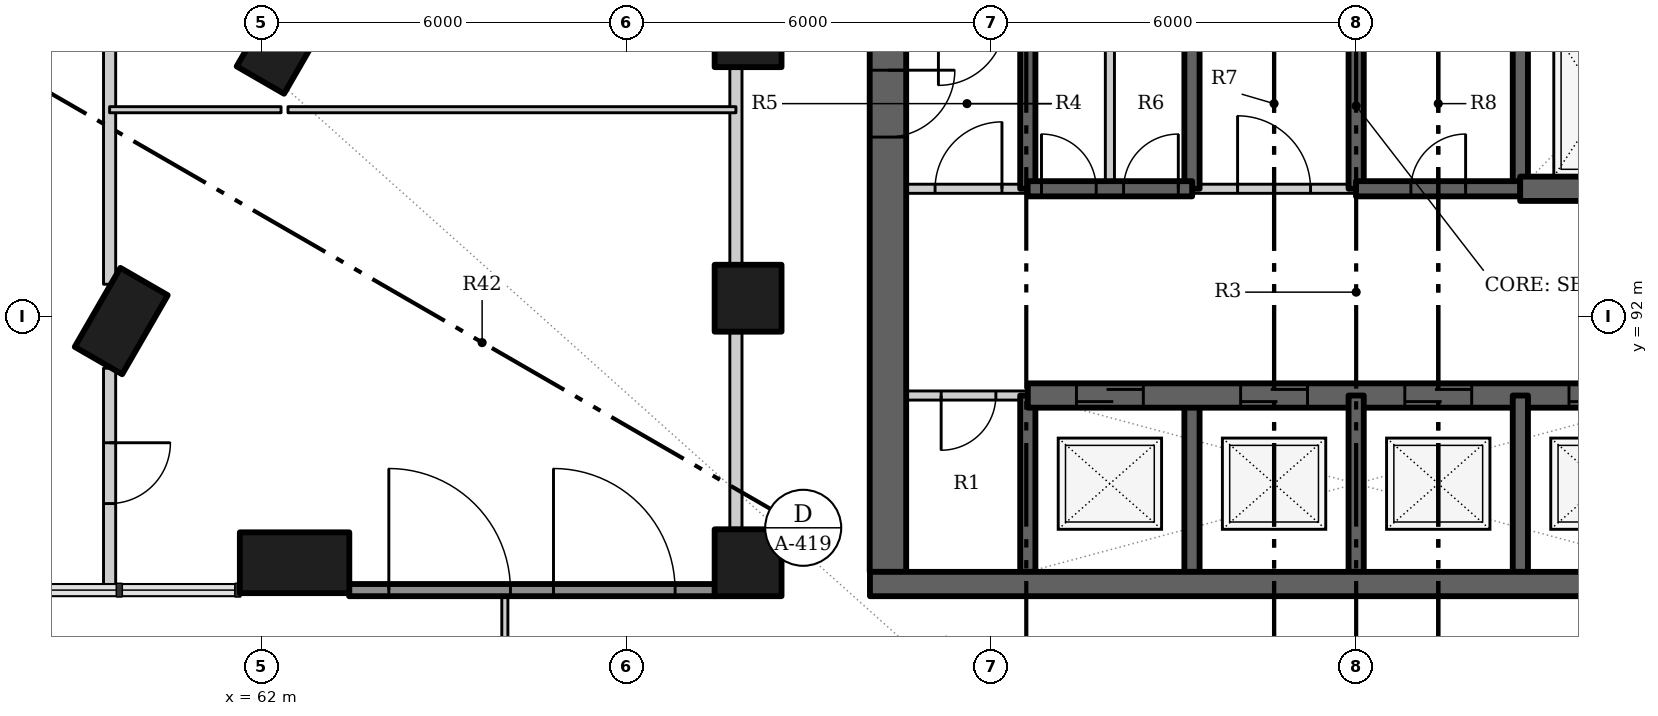
"""IFC4 building model, lengths in metres.
Left out: names, types, materials, properties, quantities, classifications, styles, units other than length and angle.
Written with IfcOpenShell. Run it as: python <this file> out.ifc"""

import sys

from ifc_helpers import new_model, si_unit, direction, frame, frame_2d, origin, origin_2d, place, context, subcontext, project, spatial, rectangle, extrude, element, fill, save


model = new_model("IFC4")
c1 = context("Model", 3, precision=1e-05, world=origin(), true_north=direction((0.0, 1.0)))
c2 = subcontext(c1, "Body", "Model", "MODEL_VIEW")
j1 = project(units=[si_unit("LENGTHUNIT", "METRE"), si_unit("PLANEANGLEUNIT", "RADIAN")], contexts=[c1])
p1 = place(None, origin())
s1 = spatial("IfcSite", under=j1, at=p1, CompositionType="ELEMENT")
p2 = place(p1, origin())
s2 = spatial("IfcBuilding", under=s1, at=p2, CompositionType="ELEMENT")
p3 = place(p2, origin())
s3 = spatial("IfcBuildingStorey", under=s2, at=p3, CompositionType="ELEMENT", Elevation=0.0)
for number, where, z_axis, x_axis in (
    (1, (62.354, 96.537, -1.8), (0.0, 0.0, 1.0), (-0.5, -0.866, 0.0)),
    (2, (59.692, 91.925, -1.8), (0.0, 0.0, 1.0), (-0.5, -0.866, 0.0)),
):
    element("IfcColumn", number, at=place(p3, frame(where, z_axis=z_axis, x_axis=x_axis)), inside=s3, PredefinedType="COLUMN", context=c2, shape_type="SweptSolid", body=[
        extrude(rectangle(XDim=1.5, YDim=0.9, at=origin_2d()), origin(), (0.0, 0.0, 1.0), 8.4),
    ])
for number, where, z_axis, x_axis in (
    (3, (70.0, 96.65, -1.8), (0.0, 0.0, 1.0), (0.0, -1.0, 0.0)),
    (4, (70.0, 92.3, -1.8), (0.0, 0.0, 1.0), (0.0, -1.0, 0.0)),
    (5, (70.0, 87.95, -1.8), (0.0, 0.0, 1.0), (0.0, -1.0, 0.0)),
):
    element("IfcColumn", number, at=place(p3, frame(where, z_axis=z_axis, x_axis=x_axis)), inside=s3, PredefinedType="COLUMN", context=c2, shape_type="SweptSolid", body=[
        extrude(rectangle(XDim=1.1, YDim=1.1, at=origin_2d()), origin(), (0.0, 0.0, 1.0), 8.4),
    ])
p4 = place(p3, frame((62.542, 87.95, -1.8), z_axis=(0.0, 0.0, 1.0), x_axis=(1.0, 0.0, 0.0)))
e6 = element("IfcColumn", 6, at=p4, inside=s3, PredefinedType="COLUMN", context=c2, shape_type="SweptSolid", body=[
    extrude(rectangle(XDim=1.8, YDim=1.0, at=origin_2d()), origin(), (0.0, 0.0, 1.0), 8.4),
])
p5 = place(p3, frame((63.438, 87.5, 0.0), z_axis=(0.0, 0.0, 1.0), x_axis=(1.0, 0.0, 0.0)))
e7 = element("IfcWall", 7, at=p5, inside=s3, PredefinedType="SOLIDWALL", context=c2, shape_type="SweptSolid", body=[
    extrude(rectangle(XDim=6.016, YDim=0.2, at=frame_2d((3.008, 0.0))), origin(), (0.0, 0.0, 1.0), 5.4),
])
p6 = place(p5, frame((0.654, 0.0, 0.0)))
e8 = element("IfcOpeningElement", 8, at=p6, cuts=e7, PredefinedType="OPENING", context=c2, shape_type="SweptSolid", body=[
    extrude(rectangle(XDim=2.0, YDim=2.4, at=frame_2d((1.0, 1.2))), frame((0.0, 0.11, 0.0), z_axis=(0.0, -1.0, 0.0), x_axis=(1.0, 0.0, 0.0)), (0.0, 0.0, 1.0), 0.22),
])
p7 = place(p5, frame((3.362, 0.0, 0.0)))
e9 = element("IfcOpeningElement", 9, at=p7, cuts=e7, PredefinedType="OPENING", context=c2, shape_type="SweptSolid", body=[
    extrude(rectangle(XDim=2.0, YDim=2.4, at=frame_2d((1.0, 1.2))), frame((0.0, 0.11, 0.0), z_axis=(0.0, -1.0, 0.0), x_axis=(1.0, 0.0, 0.0)), (0.0, 0.0, 1.0), 0.22),
])
p8 = place(p3, frame((74.6, 87.8, -1.8), z_axis=(0.0, 0.0, 1.0), x_axis=(0.0, 1.0, 0.0)))
e10 = element("IfcWall", 10, at=p8, inside=s3, PredefinedType="SHEAR", context=c2, shape_type="SweptSolid", body=[
    extrude(rectangle(XDim=2.9, YDim=0.25, at=frame_2d((1.45, 0.0))), origin(), (0.0, 0.0, 1.0), 8.1),
])
p9 = place(p3, frame((74.6, 94.1, -1.8), z_axis=(0.0, 0.0, 1.0), x_axis=(0.0, 1.0, 0.0)))
e11 = element("IfcWall", 11, at=p9, inside=s3, PredefinedType="SHEAR", context=c2, shape_type="SweptSolid", body=[
    extrude(rectangle(XDim=2.8, YDim=0.25, at=frame_2d((1.4, 0.0))), origin(), (0.0, 0.0, 1.0), 8.1),
])
p10 = place(p3, frame((74.6, 90.7, 0.0), z_axis=(0.0, 0.0, 1.0), x_axis=(-1.0, 0.0, 0.0)))
e12 = element("IfcWall", 12, at=p10, inside=s3, PredefinedType="PARTITIONING", context=c2, shape_type="SweptSolid", body=[
    extrude(rectangle(XDim=2.6, YDim=0.15, at=frame_2d((1.3, 0.0))), origin(), (0.0, 0.0, 1.0), 6.3),
])
p11 = place(p10, frame((0.525, 0.0, 0.0)))
e13 = element("IfcOpeningElement", 13, at=p11, cuts=e12, PredefinedType="OPENING", context=c2, shape_type="SweptSolid", body=[
    extrude(rectangle(XDim=0.9, YDim=2.1, at=frame_2d((0.45, 1.05))), frame((0.0, 0.085, 0.0), z_axis=(0.0, -1.0, 0.0), x_axis=(1.0, 0.0, 0.0)), (0.0, 0.0, 1.0), 0.17),
])
p12 = place(p3, frame((72.3, 96.9, -1.8), z_axis=(0.0, 0.0, 1.0), x_axis=(0.0, -1.0, 0.0)))
e14 = element("IfcWall", 14, at=p12, inside=s3, PredefinedType="SHEAR", context=c2, shape_type="SweptSolid", body=[
    extrude(rectangle(XDim=9.1, YDim=0.6, at=frame_2d((4.55, 0.0))), origin(), (0.0, 0.0, 1.0), 8.1),
])
p13 = place(p12, frame((0.85, 0.0, 1.8)))
e15 = element("IfcOpeningElement", 15, at=p13, cuts=e14, PredefinedType="OPENING", context=c2, shape_type="SweptSolid", body=[
    extrude(rectangle(XDim=1.1, YDim=2.1, at=frame_2d((0.55, 1.05))), frame((0.0, 0.31, 0.0), z_axis=(0.0, -1.0, 0.0), x_axis=(1.0, 0.0, 0.0)), (0.0, 0.0, 1.0), 0.62),
])
p14 = place(p3, frame((77.3, 87.8, -1.8), z_axis=(0.0, 0.0, 1.0), x_axis=(0.0, 1.0, 0.0)))
e16 = element("IfcWall", 16, at=p14, inside=s3, PredefinedType="SHEAR", context=c2, shape_type="SweptSolid", body=[
    extrude(rectangle(XDim=2.9, YDim=0.25, at=frame_2d((1.45, 0.0))), origin(), (0.0, 0.0, 1.0), 8.1),
])
p15 = place(p3, frame((77.3, 94.1, -1.8), z_axis=(0.0, 0.0, 1.0), x_axis=(0.0, 1.0, 0.0)))
e17 = element("IfcWall", 17, at=p15, inside=s3, PredefinedType="SHEAR", context=c2, shape_type="SweptSolid", body=[
    extrude(rectangle(XDim=2.8, YDim=0.25, at=frame_2d((1.4, 0.0))), origin(), (0.0, 0.0, 1.0), 8.1),
])
p16 = place(p3, frame((74.6, 90.7, -1.8), z_axis=(0.0, 0.0, 1.0), x_axis=(1.0, 0.0, 0.0)))
e18 = element("IfcWall", 18, at=p16, inside=s3, PredefinedType="SHEAR", context=c2, shape_type="SweptSolid", body=[
    extrude(rectangle(XDim=10.8, YDim=0.4, at=frame_2d((5.4, 0.0))), origin(), (0.0, 0.0, 1.0), 8.1),
])
p17 = place(p16, frame((0.8, 0.0, 1.8)))
e19 = element("IfcOpeningElement", 19, at=p17, cuts=e18, PredefinedType="OPENING", context=c2, shape_type="SweptSolid", body=[
    extrude(rectangle(XDim=1.1, YDim=2.1, at=frame_2d((0.55, 1.05))), frame((0.0, 0.21, 0.0), z_axis=(0.0, -1.0, 0.0), x_axis=(1.0, 0.0, 0.0)), (0.0, 0.0, 1.0), 0.42),
])
p18 = place(p16, frame((3.5, 0.0, 1.8)))
e20 = element("IfcOpeningElement", 20, at=p18, cuts=e18, PredefinedType="OPENING", context=c2, shape_type="SweptSolid", body=[
    extrude(rectangle(XDim=1.1, YDim=2.1, at=frame_2d((0.55, 1.05))), frame((0.0, 0.21, 0.0), z_axis=(0.0, -1.0, 0.0), x_axis=(1.0, 0.0, 0.0)), (0.0, 0.0, 1.0), 0.42),
])
p19 = place(p16, frame((6.2, 0.0, 1.8)))
e21 = element("IfcOpeningElement", 21, at=p19, cuts=e18, PredefinedType="OPENING", context=c2, shape_type="SweptSolid", body=[
    extrude(rectangle(XDim=1.1, YDim=2.1, at=frame_2d((0.55, 1.05))), frame((0.0, 0.21, 0.0), z_axis=(0.0, -1.0, 0.0), x_axis=(1.0, 0.0, 0.0)), (0.0, 0.0, 1.0), 0.42),
])
p20 = place(p16, frame((8.9, 0.0, 1.8)))
e22 = element("IfcOpeningElement", 22, at=p20, cuts=e18, PredefinedType="OPENING", context=c2, shape_type="SweptSolid", body=[
    extrude(rectangle(XDim=1.1, YDim=2.1, at=frame_2d((0.55, 1.05))), frame((0.0, 0.21, 0.0), z_axis=(0.0, -1.0, 0.0), x_axis=(1.0, 0.0, 0.0)), (0.0, 0.0, 1.0), 0.42),
])
p21 = place(p3, frame((80.0, 87.8, -1.8), z_axis=(0.0, 0.0, 1.0), x_axis=(0.0, 1.0, 0.0)))
e23 = element("IfcWall", 23, at=p21, inside=s3, PredefinedType="SHEAR", context=c2, shape_type="SweptSolid", body=[
    extrude(rectangle(XDim=2.9, YDim=0.25, at=frame_2d((1.45, 0.0))), origin(), (0.0, 0.0, 1.0), 8.1),
])
p22 = place(p3, frame((80.0, 94.1, -1.8), z_axis=(0.0, 0.0, 1.0), x_axis=(0.0, 1.0, 0.0)))
e24 = element("IfcWall", 24, at=p22, inside=s3, PredefinedType="SHEAR", context=c2, shape_type="SweptSolid", body=[
    extrude(rectangle(XDim=2.8, YDim=0.25, at=frame_2d((1.4, 0.0))), origin(), (0.0, 0.0, 1.0), 8.1),
])
p23 = place(p3, frame((82.7, 87.8, -1.8), z_axis=(0.0, 0.0, 1.0), x_axis=(0.0, 1.0, 0.0)))
e25 = element("IfcWall", 25, at=p23, inside=s3, PredefinedType="SHEAR", context=c2, shape_type="SweptSolid", body=[
    extrude(rectangle(XDim=2.9, YDim=0.25, at=frame_2d((1.45, 0.0))), origin(), (0.0, 0.0, 1.0), 8.1),
])
p24 = place(p3, frame((82.7, 94.1, -1.8), z_axis=(0.0, 0.0, 1.0), x_axis=(0.0, 1.0, 0.0)))
e26 = element("IfcWall", 26, at=p24, inside=s3, PredefinedType="SHEAR", context=c2, shape_type="SweptSolid", body=[
    extrude(rectangle(XDim=2.8, YDim=0.25, at=frame_2d((1.4, 0.0))), origin(), (0.0, 0.0, 1.0), 8.1),
])
p25 = place(p3, frame((72.0, 94.1, 0.0), z_axis=(0.0, 0.0, 1.0), x_axis=(1.0, 0.0, 0.0)))
e27 = element("IfcWall", 27, at=p25, inside=s3, PredefinedType="PARTITIONING", context=c2, shape_type="SweptSolid", body=[
    extrude(rectangle(XDim=2.603, YDim=0.15, at=frame_2d((1.302, 0.0))), origin(), (0.0, 0.0, 1.0), 6.3),
])
p26 = place(p25, frame((1.075, 0.0, 0.0)))
e28 = element("IfcOpeningElement", 28, at=p26, cuts=e27, PredefinedType="OPENING", context=c2, shape_type="SweptSolid", body=[
    extrude(rectangle(XDim=1.1, YDim=2.1, at=frame_2d((0.55, 1.05))), frame((0.0, 0.085, 0.0), z_axis=(0.0, -1.0, 0.0), x_axis=(1.0, 0.0, 0.0)), (0.0, 0.0, 1.0), 0.17),
])
p27 = place(p3, frame((77.297, 94.1, 0.0), z_axis=(0.0, 0.0, 1.0), x_axis=(1.0, 0.0, 0.0)))
e29 = element("IfcWall", 29, at=p27, inside=s3, PredefinedType="PARTITIONING", context=c2, shape_type="SweptSolid", body=[
    extrude(rectangle(XDim=2.706, YDim=0.15, at=frame_2d((1.353, 0.0))), origin(), (0.0, 0.0, 1.0), 6.3),
])
p28 = place(p27, frame((0.753, 0.0, 0.0)))
e30 = element("IfcOpeningElement", 30, at=p28, cuts=e29, PredefinedType="OPENING", context=c2, shape_type="SweptSolid", body=[
    extrude(rectangle(XDim=1.2, YDim=2.1, at=frame_2d((0.6, 1.05))), frame((0.0, 0.085, 0.0), z_axis=(0.0, -1.0, 0.0), x_axis=(1.0, 0.0, 0.0)), (0.0, 0.0, 1.0), 0.17),
])
p29 = place(p3, frame((74.597, 94.1, -1.8), z_axis=(0.0, 0.0, 1.0), x_axis=(1.0, 0.0, 0.0)))
e31 = element("IfcWall", 31, at=p29, inside=s3, PredefinedType="SHEAR", context=c2, shape_type="SweptSolid", body=[
    extrude(rectangle(XDim=2.706, YDim=0.25, at=frame_2d((1.353, 0.0))), origin(), (0.0, 0.0, 1.0), 8.1),
])
p30 = place(p29, frame((0.228, 0.0, 1.8)))
e32 = element("IfcOpeningElement", 32, at=p30, cuts=e31, PredefinedType="OPENING", context=c2, shape_type="SweptSolid", body=[
    extrude(rectangle(XDim=0.9, YDim=2.1, at=frame_2d((0.45, 1.05))), frame((0.0, 0.135, 0.0), z_axis=(0.0, -1.0, 0.0), x_axis=(1.0, 0.0, 0.0)), (0.0, 0.0, 1.0), 0.27),
])
p31 = place(p29, frame((1.578, 0.0, 1.8)))
e33 = element("IfcOpeningElement", 33, at=p31, cuts=e31, PredefinedType="OPENING", context=c2, shape_type="SweptSolid", body=[
    extrude(rectangle(XDim=0.9, YDim=2.1, at=frame_2d((0.45, 1.05))), frame((0.0, 0.135, 0.0), z_axis=(0.0, -1.0, 0.0), x_axis=(1.0, 0.0, 0.0)), (0.0, 0.0, 1.0), 0.27),
])
p32 = place(p3, frame((79.997, 94.1, -1.8), z_axis=(0.0, 0.0, 1.0), x_axis=(1.0, 0.0, 0.0)))
e34 = element("IfcWall", 34, at=p32, inside=s3, PredefinedType="SHEAR", context=c2, shape_type="SweptSolid", body=[
    extrude(rectangle(XDim=2.706, YDim=0.25, at=frame_2d((1.353, 0.0))), origin(), (0.0, 0.0, 1.0), 8.1),
])
p33 = place(p32, frame((0.903, 0.0, 1.8)))
e35 = element("IfcOpeningElement", 35, at=p33, cuts=e34, PredefinedType="OPENING", context=c2, shape_type="SweptSolid", body=[
    extrude(rectangle(XDim=0.9, YDim=2.1, at=frame_2d((0.45, 1.05))), frame((0.0, 0.135, 0.0), z_axis=(0.0, -1.0, 0.0), x_axis=(1.0, 0.0, 0.0)), (0.0, 0.0, 1.0), 0.27),
])
p34 = place(p3, frame((82.697, 94.1, -1.8), z_axis=(0.0, 0.0, 1.0), x_axis=(1.0, 0.0, 0.0)))
e36 = element("IfcWall", 36, at=p34, inside=s3, PredefinedType="SHEAR", context=c2, shape_type="SweptSolid", body=[
    extrude(rectangle(XDim=2.706, YDim=0.4, at=frame_2d((1.353, 0.0))), origin(), (0.0, 0.0, 1.0), 8.1),
])
p35 = place(p3, frame((75.95, 94.1, 0.0), z_axis=(0.0, 0.0, 1.0), x_axis=(0.0, 1.0, 0.0)))
e37 = element("IfcWall", 37, at=p35, inside=s3, PredefinedType="PARTITIONING", context=c2, shape_type="SweptSolid", body=[
    extrude(rectangle(XDim=2.8, YDim=0.15, at=frame_2d((1.4, 0.0))), origin(), (0.0, 0.0, 1.0), 6.3),
])
p36 = place(p3, frame((59.5, 91.149, 0.0), z_axis=(0.0, 0.0, 1.0), x_axis=(0.0, -1.0, 0.0)))
e38 = element("IfcWall", 38, at=p36, inside=s3, PredefinedType="PARTITIONING", context=c2, shape_type="SweptSolid", body=[
    extrude(rectangle(XDim=3.569, YDim=0.2, at=frame_2d((1.785, 0.0))), origin(), (0.0, 0.0, 1.0), 5.53),
])
p37 = place(p36, frame((1.226, 0.0, 0.0)))
e39 = element("IfcOpeningElement", 39, at=p37, cuts=e38, PredefinedType="OPENING", context=c2, shape_type="SweptSolid", body=[
    extrude(rectangle(XDim=1.0, YDim=2.1, at=frame_2d((0.5, 1.05))), frame((0.0, 0.11, 0.0), z_axis=(0.0, -1.0, 0.0), x_axis=(1.0, 0.0, 0.0)), (0.0, 0.0, 1.0), 0.22),
])
p38 = place(p3, frame((59.5, 92.53, 0.0), z_axis=(0.0, 0.0, 1.0), x_axis=(0.0, 1.0, 0.0)))
e40 = element("IfcWall", 40, at=p38, inside=s3, PredefinedType="PARTITIONING", context=c2, shape_type="SweptSolid", body=[
    extrude(rectangle(XDim=10.873, YDim=0.2, at=frame_2d((5.437, 0.0))), origin(), (0.0, 0.0, 1.0), 6.3),
])
p39 = place(p3, frame((69.8, 88.517, 0.0), z_axis=(0.0, 0.0, 1.0), x_axis=(0.0, 1.0, 0.0)))
e41 = element("IfcWall", 41, at=p39, inside=s3, PredefinedType="PARTITIONING", context=c2, shape_type="SweptSolid", body=[
    extrude(rectangle(XDim=3.216, YDim=0.2, at=frame_2d((1.608, 0.0))), origin(), (0.0, 0.0, 1.0), 5.53),
])
p40 = place(p3, frame((69.8, 92.867, 0.0), z_axis=(0.0, 0.0, 1.0), x_axis=(0.0, 1.0, 0.0)))
e42 = element("IfcWall", 42, at=p40, inside=s3, PredefinedType="PARTITIONING", context=c2, shape_type="SweptSolid", body=[
    extrude(rectangle(XDim=3.216, YDim=0.2, at=frame_2d((1.608, 0.0))), origin(), (0.0, 0.0, 1.0), 5.53),
])
p41 = place(p3, frame((59.5, 95.4, 0.0), z_axis=(0.0, 0.0, 1.0), x_axis=(1.0, 0.0, 0.0)))
e43 = element("IfcWall", 43, at=p41, inside=s3, PredefinedType="PARTITIONING", context=c2, shape_type="SweptSolid", body=[
    extrude(rectangle(XDim=2.82, YDim=0.1, at=frame_2d((1.41, 0.0))), origin(), (0.0, 0.0, 1.0), 5.38),
])
p42 = place(p3, frame((62.434, 95.4, 0.0), z_axis=(0.0, 0.0, 1.0), x_axis=(1.0, 0.0, 0.0)))
e44 = element("IfcWall", 44, at=p42, inside=s3, PredefinedType="PARTITIONING", context=c2, shape_type="SweptSolid", body=[
    extrude(rectangle(XDim=7.366, YDim=0.1, at=frame_2d((3.683, 0.0))), origin(), (0.0, 0.0, 1.0), 6.3),
])
p43 = place(p3, frame((66.0, 72.6, 0.0), z_axis=(0.0, 0.0, 1.0), x_axis=(0.0, 1.0, 0.0)))
e45 = element("IfcWall", 45, at=p43, inside=s3, PredefinedType="PARTITIONING", context=c2, shape_type="SweptSolid", body=[
    extrude(rectangle(XDim=14.8, YDim=0.1, at=frame_2d((7.4, 0.0))), origin(), (0.0, 0.0, 1.0), 6.3),
])
p44 = place(p43, frame((6.65, 0.0, 0.0)))
e46 = element("IfcOpeningElement", 46, at=p44, cuts=e45, PredefinedType="OPENING", context=c2, shape_type="SweptSolid", body=[
    extrude(rectangle(XDim=1.5, YDim=2.1, at=frame_2d((0.75, 1.05))), frame((0.0, 0.06, 0.0), z_axis=(0.0, -1.0, 0.0), x_axis=(1.0, 0.0, 0.0)), (0.0, 0.0, 1.0), 0.12),
])
p45 = place(p3, frame((72.004, 87.6, -1.8), z_axis=(0.0, 0.0, 1.0), x_axis=(1.0, 0.0, 0.0)))
e47 = element("IfcWall", 47, at=p45, inside=s3, PredefinedType="SHEAR", context=c2, shape_type="SweptSolid", body=[
    extrude(rectangle(XDim=15.992, YDim=0.4, at=frame_2d((7.996, 0.0))), origin(), (0.0, 0.0, 1.0), 8.1),
])
p46 = place(p6, origin())
e48 = element("IfcDoor", 48, at=p46, inside=s3, OperationType="DOUBLE_DOOR_DOUBLE_SWING", PredefinedType="DOOR", context=c2, shape_type="SweptSolid", body=[
    extrude(rectangle(XDim=2.0, YDim=2.4, at=frame_2d((1.0, 1.2))), frame((0.0, 0.025, 0.0), z_axis=(0.0, -1.0, 0.0), x_axis=(1.0, 0.0, 0.0)), (0.0, 0.0, 1.0), 0.05),
])
fill(e8, e48)
p47 = place(p7, origin())
e49 = element("IfcDoor", 49, at=p47, inside=s3, OperationType="DOUBLE_DOOR_DOUBLE_SWING", PredefinedType="DOOR", context=c2, shape_type="SweptSolid", body=[
    extrude(rectangle(XDim=2.0, YDim=2.4, at=frame_2d((1.0, 1.2))), frame((0.0, 0.025, 0.0), z_axis=(0.0, -1.0, 0.0), x_axis=(1.0, 0.0, 0.0)), (0.0, 0.0, 1.0), 0.05),
])
fill(e9, e49)
p48 = place(p11, origin())
e50 = element("IfcDoor", 50, at=p48, inside=s3, OperationType="SINGLE_SWING_RIGHT", PredefinedType="DOOR", context=c2, shape_type="SweptSolid", body=[
    extrude(rectangle(XDim=0.9, YDim=2.1, at=frame_2d((0.45, 1.05))), frame((0.0, 0.025, 0.0), z_axis=(0.0, -1.0, 0.0), x_axis=(1.0, 0.0, 0.0)), (0.0, 0.0, 1.0), 0.05),
])
fill(e13, e50)
p49 = place(p17, origin())
e51 = element("IfcDoor", 51, at=p49, inside=s3, OperationType="SLIDING_TO_LEFT", PredefinedType="DOOR", context=c2, shape_type="SweptSolid", body=[
    extrude(rectangle(XDim=1.1, YDim=2.1, at=frame_2d((0.55, 1.05))), frame((0.0, 0.025, 0.0), z_axis=(0.0, -1.0, 0.0), x_axis=(1.0, 0.0, 0.0)), (0.0, 0.0, 1.0), 0.05),
])
fill(e19, e51)
p50 = place(p18, origin())
e52 = element("IfcDoor", 52, at=p50, inside=s3, OperationType="SLIDING_TO_LEFT", PredefinedType="DOOR", context=c2, shape_type="SweptSolid", body=[
    extrude(rectangle(XDim=1.1, YDim=2.1, at=frame_2d((0.55, 1.05))), frame((0.0, 0.025, 0.0), z_axis=(0.0, -1.0, 0.0), x_axis=(1.0, 0.0, 0.0)), (0.0, 0.0, 1.0), 0.05),
])
fill(e20, e52)
p51 = place(p19, origin())
e53 = element("IfcDoor", 53, at=p51, inside=s3, OperationType="SLIDING_TO_LEFT", PredefinedType="DOOR", context=c2, shape_type="SweptSolid", body=[
    extrude(rectangle(XDim=1.1, YDim=2.1, at=frame_2d((0.55, 1.05))), frame((0.0, 0.025, 0.0), z_axis=(0.0, -1.0, 0.0), x_axis=(1.0, 0.0, 0.0)), (0.0, 0.0, 1.0), 0.05),
])
fill(e21, e53)
p52 = place(p20, origin())
e54 = element("IfcDoor", 54, at=p52, inside=s3, OperationType="SLIDING_TO_LEFT", PredefinedType="DOOR", context=c2, shape_type="SweptSolid", body=[
    extrude(rectangle(XDim=1.1, YDim=2.1, at=frame_2d((0.55, 1.05))), frame((0.0, 0.025, 0.0), z_axis=(0.0, -1.0, 0.0), x_axis=(1.0, 0.0, 0.0)), (0.0, 0.0, 1.0), 0.05),
])
fill(e22, e54)
p53 = place(p26, origin())
e55 = element("IfcDoor", 55, at=p53, inside=s3, OperationType="SINGLE_SWING_RIGHT", PredefinedType="DOOR", context=c2, shape_type="SweptSolid", body=[
    extrude(rectangle(XDim=1.1, YDim=2.1, at=frame_2d((0.55, 1.05))), frame((0.0, 0.025, 0.0), z_axis=(0.0, -1.0, 0.0), x_axis=(1.0, 0.0, 0.0)), (0.0, 0.0, 1.0), 0.05),
])
fill(e28, e55)
p54 = place(p30, origin())
e56 = element("IfcDoor", 56, at=p54, inside=s3, OperationType="SINGLE_SWING_LEFT", PredefinedType="DOOR", context=c2, shape_type="SweptSolid", body=[
    extrude(rectangle(XDim=0.9, YDim=2.1, at=frame_2d((0.45, 1.05))), frame((0.0, 0.025, 0.0), z_axis=(0.0, -1.0, 0.0), x_axis=(1.0, 0.0, 0.0)), (0.0, 0.0, 1.0), 0.05),
])
fill(e32, e56)
p55 = place(p31, origin())
e57 = element("IfcDoor", 57, at=p55, inside=s3, OperationType="SINGLE_SWING_RIGHT", PredefinedType="DOOR", context=c2, shape_type="SweptSolid", body=[
    extrude(rectangle(XDim=0.9, YDim=2.1, at=frame_2d((0.45, 1.05))), frame((0.0, 0.025, 0.0), z_axis=(0.0, -1.0, 0.0), x_axis=(1.0, 0.0, 0.0)), (0.0, 0.0, 1.0), 0.05),
])
fill(e33, e57)
p56 = place(p28, origin())
e58 = element("IfcDoor", 58, at=p56, inside=s3, OperationType="DOUBLE_DOOR_SINGLE_SWING", PredefinedType="DOOR", context=c2, shape_type="SweptSolid", body=[
    extrude(rectangle(XDim=1.2, YDim=2.1, at=frame_2d((0.6, 1.05))), frame((0.0, 0.025, 0.0), z_axis=(0.0, -1.0, 0.0), x_axis=(1.0, 0.0, 0.0)), (0.0, 0.0, 1.0), 0.05),
])
fill(e30, e58)
p57 = place(p33, origin())
e59 = element("IfcDoor", 59, at=p57, inside=s3, OperationType="SINGLE_SWING_RIGHT", PredefinedType="DOOR", context=c2, shape_type="SweptSolid", body=[
    extrude(rectangle(XDim=0.9, YDim=2.1, at=frame_2d((0.45, 1.05))), frame((0.0, 0.025, 0.0), z_axis=(0.0, -1.0, 0.0), x_axis=(1.0, 0.0, 0.0)), (0.0, 0.0, 1.0), 0.05),
])
fill(e35, e59)
p58 = place(p13, origin())
e60 = element("IfcDoor", 60, at=p58, inside=s3, OperationType="SINGLE_SWING_LEFT", PredefinedType="DOOR", context=c2, shape_type="SweptSolid", body=[
    extrude(rectangle(XDim=1.1, YDim=2.1, at=frame_2d((0.55, 1.05))), frame((0.0, 0.025, 0.0), z_axis=(0.0, -1.0, 0.0), x_axis=(1.0, 0.0, 0.0)), (0.0, 0.0, 1.0), 0.05),
])
fill(e15, e60)
p59 = place(p37, origin())
e61 = element("IfcDoor", 61, at=p59, inside=s3, OperationType="SINGLE_SWING_LEFT", PredefinedType="DOOR", context=c2, shape_type="SweptSolid", body=[
    extrude(rectangle(XDim=1.0, YDim=2.1, at=frame_2d((0.5, 1.05))), frame((0.0, 0.025, 0.0), z_axis=(0.0, -1.0, 0.0), x_axis=(1.0, 0.0, 0.0)), (0.0, 0.0, 1.0), 0.05),
])
fill(e39, e61)
save(model, sys.argv[1])
